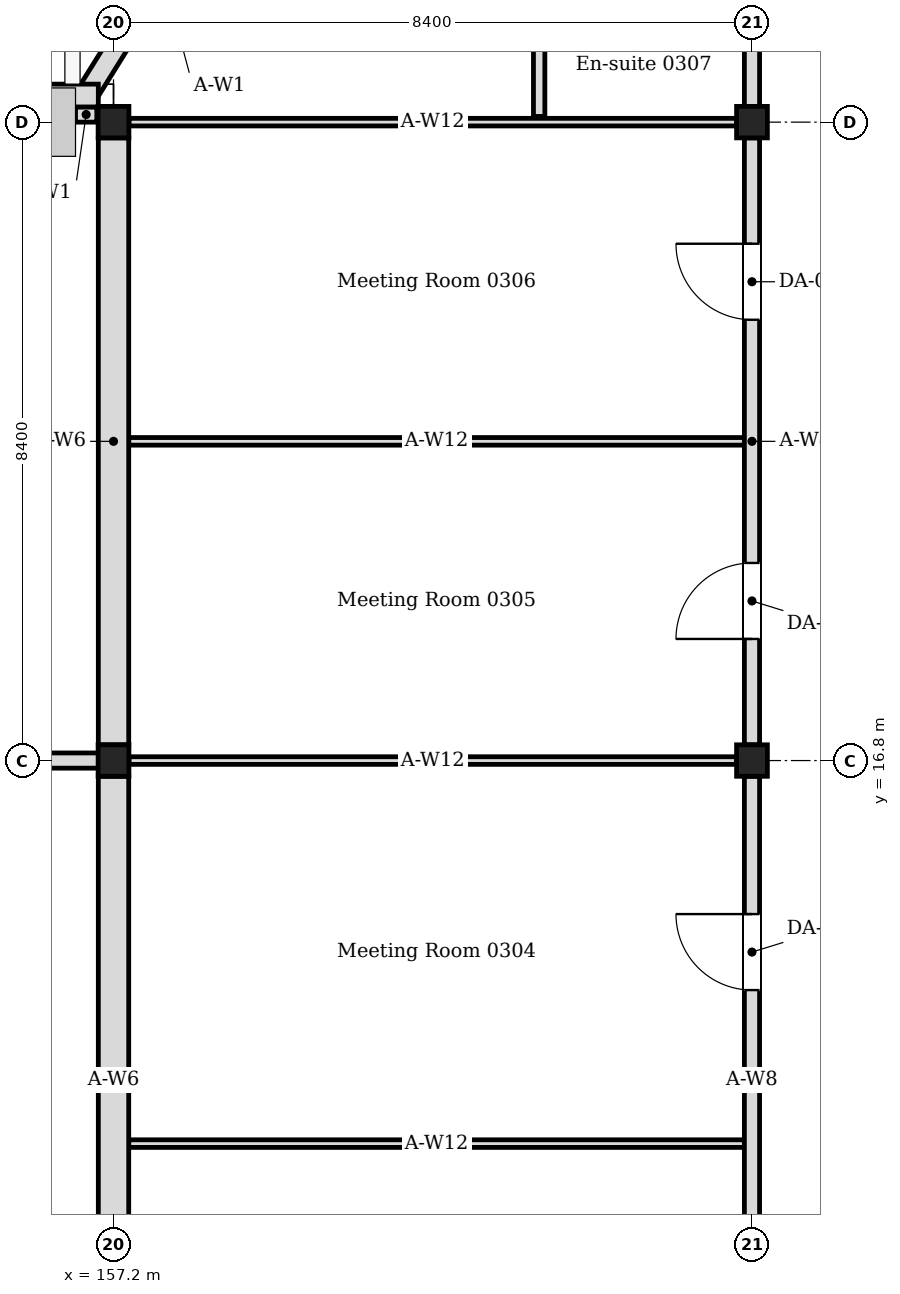
"""IFC4 building model, lengths in metres.
Left out: names, types, materials, properties, quantities, classifications, styles, units other than length and angle.
Written with IfcOpenShell. Run it as: python <this file> out.ifc"""

import sys

from ifc_helpers import new_model, si_unit, direction, frame, frame_2d, origin, origin_2d, place, context, subcontext, project, spatial, rectangle, i_section, extrude, element, fill, save


model = new_model("IFC4")
c1 = context("Model", 3, precision=1e-05, world=origin(), true_north=direction((0.0, 1.0)))
c2 = subcontext(c1, "Body", "Model", "MODEL_VIEW")
j1 = project(units=[si_unit("LENGTHUNIT", "METRE"), si_unit("PLANEANGLEUNIT", "RADIAN")], contexts=[c1])
p1 = place(None, origin())
s1 = spatial("IfcSite", under=j1, at=p1, CompositionType="ELEMENT")
p2 = place(p1, origin())
s2 = spatial("IfcBuilding", under=s1, at=p2, CompositionType="ELEMENT")
p3 = place(p2, frame((0.0, 0.0, 14.4)))
s3 = spatial("IfcBuildingStorey", under=s2, at=p3, CompositionType="ELEMENT", Elevation=14.4)
for number, where, z_axis, x_axis in (
    (1, (157.2, 16.8, 0.0), (0.0, 0.0, 1.0), (1.0, 0.0, 0.0)),
    (2, (157.2, 25.2, 0.0), (0.0, 0.0, 1.0), (1.0, 0.0, 0.0)),
    (3, (165.6, 16.8, 0.0), (0.0, 0.0, 1.0), (1.0, 0.0, 0.0)),
    (4, (165.6, 25.2, 0.0), (0.0, 0.0, 1.0), (1.0, 0.0, 0.0)),
):
    element("IfcColumn", number, at=place(p3, frame(where, z_axis=z_axis, x_axis=x_axis)), inside=s3, PredefinedType="COLUMN", context=c2, shape_type="SweptSolid", body=[
        extrude(i_section(OverallWidth=0.405, OverallDepth=0.414, WebThickness=0.018, FlangeThickness=0.028, FilletRadius=0.022, at=origin_2d()), origin(), (0.0, 0.0, 1.0), 4.2),
    ])
p4 = place(p3, frame((156.84, 25.2, 0.0), z_axis=(0.0, 0.0, 1.0), x_axis=(0.0, 1.0, 0.0)))
e5 = element("IfcWall", 5, at=p4, inside=s3, PredefinedType="SOLIDWALL", context=c2, shape_type="SweptSolid", body=[
    extrude(rectangle(XDim=0.2, YDim=0.28, at=frame_2d((0.1, 0.0))), origin(), (0.0, 0.0, 1.0), 4.05),
])
p5 = place(p3, frame((156.886, 25.624, 0.0), z_axis=(0.0, 0.0, 1.0), x_axis=(0.528992500338, 0.848626498871, 0.0)))
e6 = element("IfcWall", 6, at=p5, inside=s3, PredefinedType="SOLIDWALL", context=c2, shape_type="SweptSolid", body=[
    extrude(rectangle(XDim=4.145, YDim=0.28, at=frame_2d((2.072, 0.0))), origin(), (0.0, 0.0, 1.0), 4.05),
])
p6 = place(p5, frame((0.812, 0.0, 0.6)))
e7 = element("IfcOpeningElement", 7, at=p6, cuts=e6, PredefinedType="OPENING", context=c2, shape_type="SweptSolid", body=[
    extrude(rectangle(XDim=2.52, YDim=2.4, at=frame_2d((1.26, 1.2))), frame((0.0, 0.15, 0.0), z_axis=(0.0, -1.0, 0.0), x_axis=(1.0, 0.0, 0.0)), (0.0, 0.0, 1.0), 0.3),
])
p7 = place(p3, frame((151.1, 25.55, 0.0), z_axis=(0.0, 0.0, 1.0), x_axis=(1.0, 0.0, 0.0)))
e8 = element("IfcWall", 8, at=p7, inside=s3, PredefinedType="SOLIDWALL", context=c2, shape_type="SweptSolid", body=[
    extrude(rectangle(XDim=5.9, YDim=0.3, at=frame_2d((2.95, 0.0))), origin(), (0.0, 0.0, 1.0), 3.95),
])
p8 = place(p7, frame((0.34, 0.0, 1.5)))
e9 = element("IfcOpeningElement", 9, at=p8, cuts=e8, PredefinedType="OPENING", context=c2, shape_type="SweptSolid", body=[
    extrude(rectangle(XDim=1.2, YDim=1.2, at=frame_2d((0.6, 0.6))), frame((0.0, 0.16, 0.0), z_axis=(0.0, -1.0, 0.0), x_axis=(1.0, 0.0, 0.0)), (0.0, 0.0, 1.0), 0.32),
])
p9 = place(p7, frame((2.02, 0.0, 1.5)))
e10 = element("IfcOpeningElement", 10, at=p9, cuts=e8, PredefinedType="OPENING", context=c2, shape_type="SweptSolid", body=[
    extrude(rectangle(XDim=1.2, YDim=1.2, at=frame_2d((0.6, 0.6))), frame((0.0, 0.16, 0.0), z_axis=(0.0, -1.0, 0.0), x_axis=(1.0, 0.0, 0.0)), (0.0, 0.0, 1.0), 0.32),
])
p10 = place(p7, frame((3.7, 0.0, 1.5)))
e11 = element("IfcOpeningElement", 11, at=p10, cuts=e8, PredefinedType="OPENING", context=c2, shape_type="SweptSolid", body=[
    extrude(rectangle(XDim=1.2, YDim=1.2, at=frame_2d((0.6, 0.6))), frame((0.0, 0.16, 0.0), z_axis=(0.0, -1.0, 0.0), x_axis=(1.0, 0.0, 0.0)), (0.0, 0.0, 1.0), 0.32),
])
p11 = place(p3, frame((162.8, 25.275, 0.0), z_axis=(0.0, 0.0, 1.0), x_axis=(0.0, 1.0, 0.0)))
e12 = element("IfcWall", 12, at=p11, inside=s3, PredefinedType="PARTITIONING", context=c2, shape_type="SweptSolid", body=[
    extrude(rectangle(XDim=2.325, YDim=0.15, at=frame_2d((1.163, 0.0))), origin(), (0.0, 0.0, 1.0), 4.05),
])
for number, where, z_axis, x_axis in (
    (13, (157.403, 16.8, 0.0), (0.0, 0.0, 1.0), (1.0, 0.0, 0.0)),
    (14, (157.403, 25.2, 0.0), (0.0, 0.0, 1.0), (1.0, 0.0, 0.0)),
):
    element("IfcWall", number, at=place(p3, frame(where, z_axis=z_axis, x_axis=x_axis)), inside=s3, PredefinedType="PARTITIONING", context=c2, shape_type="SweptSolid", body=[
        extrude(rectangle(XDim=7.995, YDim=0.1, at=frame_2d((3.998, 0.0))), origin(), (0.0, 0.0, 1.0), 3.604),
    ])
for number, where, z_axis, x_axis in (
    (15, (157.4, 11.76, 0.0), (0.0, 0.0, 1.0), (1.0, 0.0, 0.0)),
    (16, (157.4, 21.0, 0.0), (0.0, 0.0, 1.0), (1.0, 0.0, 0.0)),
):
    element("IfcWall", number, at=place(p3, frame(where, z_axis=z_axis, x_axis=x_axis)), inside=s3, PredefinedType="PARTITIONING", context=c2, shape_type="SweptSolid", body=[
        extrude(rectangle(XDim=8.1, YDim=0.1, at=frame_2d((4.05, 0.0))), origin(), (0.0, 0.0, 1.0), 3.604),
    ])
p12 = place(p3, frame((157.2, 8.607, 0.0), z_axis=(0.0, 0.0, 1.0), x_axis=(0.0, 1.0, 0.0)))
e17 = element("IfcWall", 17, at=p12, inside=s3, PredefinedType="SOLIDWALL", context=c2, shape_type="SweptSolid", body=[
    extrude(rectangle(XDim=7.986, YDim=0.4, at=frame_2d((3.993, 0.0))), origin(), (0.0, 0.0, 1.0), 3.45),
])
p13 = place(p3, frame((157.2, 17.007, 0.0), z_axis=(0.0, 0.0, 1.0), x_axis=(0.0, 1.0, 0.0)))
e18 = element("IfcWall", 18, at=p13, inside=s3, PredefinedType="SOLIDWALL", context=c2, shape_type="SweptSolid", body=[
    extrude(rectangle(XDim=7.986, YDim=0.4, at=frame_2d((3.993, 0.0))), origin(), (0.0, 0.0, 1.0), 3.45),
])
p14 = place(p3, frame((165.6, 8.607, 0.0), z_axis=(0.0, 0.0, 1.0), x_axis=(0.0, 1.0, 0.0)))
e19 = element("IfcWall", 19, at=p14, inside=s3, PredefinedType="PARTITIONING", context=c2, shape_type="SweptSolid", body=[
    extrude(rectangle(XDim=7.986, YDim=0.2, at=frame_2d((3.993, 0.0))), origin(), (0.0, 0.0, 1.0), 3.45),
])
p15 = place(p14, frame((0.973, 0.0, 0.0)))
e20 = element("IfcOpeningElement", 20, at=p15, cuts=e19, PredefinedType="OPENING", context=c2, shape_type="SweptSolid", body=[
    extrude(rectangle(XDim=1.0, YDim=2.1, at=frame_2d((0.5, 1.05))), frame((0.0, 0.11, 0.0), z_axis=(0.0, -1.0, 0.0), x_axis=(1.0, 0.0, 0.0)), (0.0, 0.0, 1.0), 0.22),
])
p16 = place(p14, frame((5.173, 0.0, 0.0)))
e21 = element("IfcOpeningElement", 21, at=p16, cuts=e19, PredefinedType="OPENING", context=c2, shape_type="SweptSolid", body=[
    extrude(rectangle(XDim=1.0, YDim=2.1, at=frame_2d((0.5, 1.05))), frame((0.0, 0.11, 0.0), z_axis=(0.0, -1.0, 0.0), x_axis=(1.0, 0.0, 0.0)), (0.0, 0.0, 1.0), 0.22),
])
p17 = place(p3, frame((165.6, 17.007, 0.0), z_axis=(0.0, 0.0, 1.0), x_axis=(0.0, 1.0, 0.0)))
e22 = element("IfcWall", 22, at=p17, inside=s3, PredefinedType="PARTITIONING", context=c2, shape_type="SweptSolid", body=[
    extrude(rectangle(XDim=7.986, YDim=0.2, at=frame_2d((3.993, 0.0))), origin(), (0.0, 0.0, 1.0), 3.45),
])
p18 = place(p17, frame((1.393, 0.0, 0.0)))
e23 = element("IfcOpeningElement", 23, at=p18, cuts=e22, PredefinedType="OPENING", context=c2, shape_type="SweptSolid", body=[
    extrude(rectangle(XDim=1.0, YDim=2.1, at=frame_2d((0.5, 1.05))), frame((0.0, 0.11, 0.0), z_axis=(0.0, -1.0, 0.0), x_axis=(1.0, 0.0, 0.0)), (0.0, 0.0, 1.0), 0.22),
])
p19 = place(p17, frame((5.593, 0.0, 0.0)))
e24 = element("IfcOpeningElement", 24, at=p19, cuts=e22, PredefinedType="OPENING", context=c2, shape_type="SweptSolid", body=[
    extrude(rectangle(XDim=1.0, YDim=2.1, at=frame_2d((0.5, 1.05))), frame((0.0, 0.11, 0.0), z_axis=(0.0, -1.0, 0.0), x_axis=(1.0, 0.0, 0.0)), (0.0, 0.0, 1.0), 0.22),
])
p20 = place(p3, frame((165.6, 25.407, 0.0), z_axis=(0.0, 0.0, 1.0), x_axis=(0.0, 1.0, 0.0)))
e25 = element("IfcWall", 25, at=p20, inside=s3, PredefinedType="PARTITIONING", context=c2, shape_type="SweptSolid", body=[
    extrude(rectangle(XDim=7.986, YDim=0.2, at=frame_2d((3.993, 0.0))), origin(), (0.0, 0.0, 1.0), 3.45),
])
p21 = place(p20, frame((2.493, 0.0, 0.0)))
e26 = element("IfcOpeningElement", 26, at=p21, cuts=e25, PredefinedType="OPENING", context=c2, shape_type="SweptSolid", body=[
    extrude(rectangle(XDim=1.2, YDim=2.1, at=frame_2d((0.6, 1.05))), frame((0.0, 0.11, 0.0), z_axis=(0.0, -1.0, 0.0), x_axis=(1.0, 0.0, 0.0)), (0.0, 0.0, 1.0), 0.22),
])
p22 = place(p20, frame((4.293, 0.0, 0.0)))
e27 = element("IfcOpeningElement", 27, at=p22, cuts=e25, PredefinedType="OPENING", context=c2, shape_type="SweptSolid", body=[
    extrude(rectangle(XDim=1.2, YDim=2.1, at=frame_2d((0.6, 1.05))), frame((0.0, 0.11, 0.0), z_axis=(0.0, -1.0, 0.0), x_axis=(1.0, 0.0, 0.0)), (0.0, 0.0, 1.0), 0.22),
])
p23 = place(p3, frame((151.325, 16.8, 0.0), z_axis=(0.0, 0.0, 1.0), x_axis=(1.0, 0.0, 0.0)))
e28 = element("IfcWall", 28, at=p23, inside=s3, PredefinedType="PARTITIONING", context=c2, shape_type="SweptSolid", body=[
    extrude(rectangle(XDim=5.875, YDim=0.2, at=frame_2d((2.938, 0.0))), origin(), (0.0, 0.0, 1.0), 3.25),
])
p24 = place(p23, frame((3.575, 0.0, 0.0)))
e29 = element("IfcOpeningElement", 29, at=p24, cuts=e28, PredefinedType="OPENING", context=c2, shape_type="SweptSolid", body=[
    extrude(rectangle(XDim=1.0, YDim=2.1, at=frame_2d((0.5, 1.05))), frame((0.0, 0.11, 0.0), z_axis=(0.0, -1.0, 0.0), x_axis=(1.0, 0.0, 0.0)), (0.0, 0.0, 1.0), 0.22),
])
p25 = place(p16, origin())
e30 = element("IfcDoor", 30, at=p25, inside=s3, OperationType="SINGLE_SWING_RIGHT", PredefinedType="DOOR", context=c2, shape_type="SweptSolid", body=[
    extrude(rectangle(XDim=1.0, YDim=2.1, at=frame_2d((0.5, 1.05))), frame((0.0, 0.025, 0.0), z_axis=(0.0, -1.0, 0.0), x_axis=(1.0, 0.0, 0.0)), (0.0, 0.0, 1.0), 0.05),
])
fill(e21, e30)
p26 = place(p18, origin())
e31 = element("IfcDoor", 31, at=p26, inside=s3, OperationType="SINGLE_SWING_LEFT", PredefinedType="DOOR", context=c2, shape_type="SweptSolid", body=[
    extrude(rectangle(XDim=1.0, YDim=2.1, at=frame_2d((0.5, 1.05))), frame((0.0, 0.025, 0.0), z_axis=(0.0, -1.0, 0.0), x_axis=(1.0, 0.0, 0.0)), (0.0, 0.0, 1.0), 0.05),
])
fill(e23, e31)
p27 = place(p19, origin())
e32 = element("IfcDoor", 32, at=p27, inside=s3, OperationType="SINGLE_SWING_RIGHT", PredefinedType="DOOR", context=c2, shape_type="SweptSolid", body=[
    extrude(rectangle(XDim=1.0, YDim=2.1, at=frame_2d((0.5, 1.05))), frame((0.0, 0.025, 0.0), z_axis=(0.0, -1.0, 0.0), x_axis=(1.0, 0.0, 0.0)), (0.0, 0.0, 1.0), 0.05),
])
fill(e24, e32)
save(model, sys.argv[1])
